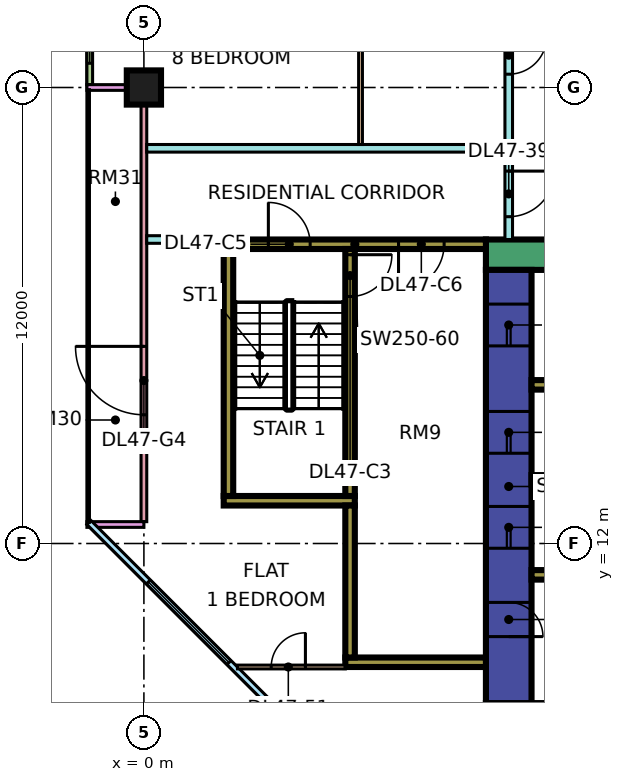
"""IFC4 building model, lengths in metres.
Left out: names, types, materials, properties, quantities, classifications, styles, units other than length and angle.
Written with IfcOpenShell. Run it as: python <this file> out.ifc"""

import sys

from ifc_helpers import new_model, si_unit, direction, frame, frame_2d, origin, origin_2d, place, context, subcontext, project, spatial, rectangle, extrude, element, fill, save


model = new_model("IFC4")
c1 = context("Model", 3, precision=1e-05, world=origin(), true_north=direction((0.0, 1.0)))
c2 = subcontext(c1, "Body", "Model", "MODEL_VIEW")
j1 = project(units=[si_unit("LENGTHUNIT", "METRE"), si_unit("PLANEANGLEUNIT", "RADIAN")], contexts=[c1])
p1 = place(None, origin())
s1 = spatial("IfcSite", under=j1, at=p1, CompositionType="ELEMENT")
p2 = place(p1, origin())
s2 = spatial("IfcBuilding", under=s1, at=p2, CompositionType="ELEMENT")
p3 = place(p2, frame((0.0, 0.0, 202.4)))
s3 = spatial("IfcBuildingStorey", under=s2, at=p3, CompositionType="ELEMENT", Elevation=202.4)
p4 = place(p3, frame((0.0, 24.0, 0.0), z_axis=(0.0, 0.0, 1.0), x_axis=(1.0, 0.0, 0.0)))
e1 = element("IfcColumn", 1, at=p4, inside=s3, PredefinedType="COLUMN", context=c2, shape_type="SweptSolid", body=[
    extrude(rectangle(XDim=0.9, YDim=0.9, at=origin_2d()), origin(), (0.0, 0.0, 1.0), 3.75),
])
p5 = place(p3, frame((9.0, 19.6, 0.0), z_axis=(0.0, 0.0, 1.0), x_axis=(1.0, 0.0, 0.0)))
e2 = element("IfcWall", 2, at=p5, inside=s3, PredefinedType="SHEAR", context=c2, shape_type="SweptSolid", body=[
    extrude(rectangle(XDim=25.0, YDim=0.8, at=frame_2d((12.5, 0.0))), origin(), (0.0, 0.0, 1.0), 3.75),
])
p6 = place(p5, frame((19.1, 0.0, 0.0)))
e3 = element("IfcOpeningElement", 3, at=p6, cuts=e2, PredefinedType="OPENING", context=c2, shape_type="SweptSolid", body=[
    extrude(rectangle(XDim=1.8, YDim=2.4, at=frame_2d((0.9, 1.2))), frame((0.0, 0.41, 0.0), z_axis=(0.0, -1.0, 0.0), x_axis=(1.0, 0.0, 0.0)), (0.0, 0.0, 1.0), 0.82),
])
p7 = place(p3, frame((9.6, 7.8, 0.0), z_axis=(0.0, 0.0, 1.0), x_axis=(0.0, 1.0, 0.0)))
e4 = element("IfcWall", 4, at=p7, inside=s3, PredefinedType="SHEAR", context=c2, shape_type="SweptSolid", body=[
    extrude(rectangle(XDim=11.4, YDim=1.2, at=frame_2d((5.7, 0.0))), origin(), (0.0, 0.0, 1.0), 3.75),
])
p8 = place(p7, frame((4.075, 0.0, 0.0)))
e5 = element("IfcOpeningElement", 5, at=p8, cuts=e4, PredefinedType="OPENING", context=c2, shape_type="SweptSolid", body=[
    extrude(rectangle(XDim=1.1, YDim=2.2, at=frame_2d((0.55, 1.1))), frame((0.0, 0.61, 0.0), z_axis=(0.0, -1.0, 0.0), x_axis=(1.0, 0.0, 0.0)), (0.0, 0.0, 1.0), 1.22),
])
p9 = place(p7, frame((6.575, 0.0, 0.0)))
e6 = element("IfcOpeningElement", 6, at=p9, cuts=e4, PredefinedType="OPENING", context=c2, shape_type="SweptSolid", body=[
    extrude(rectangle(XDim=1.1, YDim=2.2, at=frame_2d((0.55, 1.1))), frame((0.0, 0.61, 0.0), z_axis=(0.0, -1.0, 0.0), x_axis=(1.0, 0.0, 0.0)), (0.0, 0.0, 1.0), 1.22),
])
p10 = place(p7, frame((9.4, 0.0, 0.0)))
e7 = element("IfcOpeningElement", 7, at=p10, cuts=e4, PredefinedType="OPENING", context=c2, shape_type="SweptSolid", body=[
    extrude(rectangle(XDim=1.1, YDim=2.2, at=frame_2d((0.55, 1.1))), frame((0.0, 0.61, 0.0), z_axis=(0.0, -1.0, 0.0), x_axis=(1.0, 0.0, 0.0)), (0.0, 0.0, 1.0), 1.22),
])
p11 = place(p7, frame((1.75, 0.0, 0.0)))
e8 = element("IfcOpeningElement", 8, at=p11, cuts=e4, PredefinedType="OPENING", context=c2, shape_type="SweptSolid", body=[
    extrude(rectangle(XDim=0.9, YDim=2.1, at=frame_2d((0.45, 1.05))), frame((0.0, 0.61, 0.0), z_axis=(0.0, -1.0, 0.0), x_axis=(1.0, 0.0, 0.0)), (0.0, 0.0, 1.0), 1.22),
])
for number, where, z_axis, x_axis in (
    (9, (10.2, 11.175, 0.0), (0.0, 0.0, 1.0), (1.0, 0.0, 0.0)),
    (10, (10.2, 13.675, 0.0), (0.0, 0.0, 1.0), (1.0, 0.0, 0.0)),
    (11, (10.2, 16.175, 0.0), (0.0, 0.0, 1.0), (1.0, 0.0, 0.0)),
):
    element("IfcWall", number, at=place(p3, frame(where, z_axis=z_axis, x_axis=x_axis)), inside=s3, PredefinedType="SHEAR", context=c2, shape_type="SweptSolid", body=[
        extrude(rectangle(XDim=3.0, YDim=0.25, at=frame_2d((1.5, 0.0))), origin(), (0.0, 0.0, 1.0), 3.75),
    ])
p12 = place(p3, frame((2.1, 19.875, 0.0), z_axis=(0.0, 0.0, 1.0), x_axis=(1.0, 0.0, 0.0)))
e12 = element("IfcWall", 12, at=p12, inside=s3, PredefinedType="SHEAR", context=c2, shape_type="SweptSolid", body=[
    extrude(rectangle(XDim=6.9, YDim=0.25, at=frame_2d((3.45, 0.0))), origin(), (0.0, 0.0, 1.0), 3.75),
])
p13 = place(p12, frame((1.175, 0.0, 0.0)))
e13 = element("IfcOpeningElement", 13, at=p13, cuts=e12, PredefinedType="OPENING", context=c2, shape_type="SweptSolid", body=[
    extrude(rectangle(XDim=1.1, YDim=2.2, at=frame_2d((0.55, 1.1))), frame((0.0, 0.135, 0.0), z_axis=(0.0, -1.0, 0.0), x_axis=(1.0, 0.0, 0.0)), (0.0, 0.0, 1.0), 0.27),
])
p14 = place(p12, frame((4.6, 0.0, 0.0)))
e14 = element("IfcOpeningElement", 14, at=p14, cuts=e12, PredefinedType="OPENING", context=c2, shape_type="SweptSolid", body=[
    extrude(rectangle(XDim=1.2, YDim=2.2, at=frame_2d((0.6, 1.1))), frame((0.0, 0.135, 0.0), z_axis=(0.0, -1.0, 0.0), x_axis=(1.0, 0.0, 0.0)), (0.0, 0.0, 1.0), 0.27),
])
p15 = place(p3, frame((2.1, 13.125, 0.0), z_axis=(0.0, 0.0, 1.0), x_axis=(1.0, 0.0, 0.0)))
e15 = element("IfcWall", 15, at=p15, inside=s3, PredefinedType="SHEAR", context=c2, shape_type="SweptSolid", body=[
    extrude(rectangle(XDim=3.45, YDim=0.25, at=frame_2d((1.725, 0.0))), origin(), (0.0, 0.0, 1.0), 3.75),
])
p16 = place(p3, frame((2.225, 13.25, 0.0), z_axis=(0.0, 0.0, 1.0), x_axis=(0.0, 1.0, 0.0)))
e16 = element("IfcWall", 16, at=p16, inside=s3, PredefinedType="SHEAR", context=c2, shape_type="SweptSolid", body=[
    extrude(rectangle(XDim=6.5, YDim=0.25, at=frame_2d((3.25, 0.0))), origin(), (0.0, 0.0, 1.0), 3.75),
])
p17 = place(p3, frame((5.425, 13.25, 0.0), z_axis=(0.0, 0.0, 1.0), x_axis=(0.0, 1.0, 0.0)))
e17 = element("IfcWall", 17, at=p17, inside=s3, PredefinedType="SHEAR", context=c2, shape_type="SweptSolid", body=[
    extrude(rectangle(XDim=6.5, YDim=0.25, at=frame_2d((3.25, 0.0))), origin(), (0.0, 0.0, 1.0), 3.75),
])
p18 = place(p17, frame((5.25, 0.0, 0.0)))
e18 = element("IfcOpeningElement", 18, at=p18, cuts=e17, PredefinedType="OPENING", context=c2, shape_type="SweptSolid", body=[
    extrude(rectangle(XDim=1.1, YDim=2.2, at=frame_2d((0.55, 1.1))), frame((0.0, 0.135, 0.0), z_axis=(0.0, -1.0, 0.0), x_axis=(1.0, 0.0, 0.0)), (0.0, 0.0, 1.0), 0.27),
])
p19 = place(p3, frame((5.3, 8.875, 0.0), z_axis=(0.0, 0.0, 1.0), x_axis=(1.0, 0.0, 0.0)))
e19 = element("IfcWall", 19, at=p19, inside=s3, PredefinedType="SHEAR", context=c2, shape_type="SweptSolid", body=[
    extrude(rectangle(XDim=3.7, YDim=0.25, at=frame_2d((1.85, 0.0))), origin(), (0.0, 0.0, 1.0), 3.75),
])
p20 = place(p3, frame((5.425, 9.0, 0.0), z_axis=(0.0, 0.0, 1.0), x_axis=(0.0, 1.0, 0.0)))
e20 = element("IfcWall", 20, at=p20, inside=s3, PredefinedType="SHEAR", context=c2, shape_type="SweptSolid", body=[
    extrude(rectangle(XDim=4.0, YDim=0.25, at=frame_2d((2.0, 0.0))), origin(), (0.0, 0.0, 1.0), 3.75),
])
p21 = place(p3, frame((-1.425, 35.925, 0.0), z_axis=(0.0, 0.0, 1.0), x_axis=(0.0, -1.0, 0.0)))
e21 = element("IfcWall", 21, at=p21, inside=s3, PredefinedType="SOLIDWALL", context=c2, shape_type="SweptSolid", body=[
    extrude(rectangle(XDim=11.85, YDim=0.15, at=frame_2d((5.925, 0.0))), origin(), (0.0, 0.0, 1.0), 3.3),
])
p22 = place(p21, frame((0.562, 0.0, 0.45)))
e22 = element("IfcOpeningElement", 22, at=p22, cuts=e21, PredefinedType="OPENING", context=c2, shape_type="SweptSolid", body=[
    extrude(rectangle(XDim=1.8, YDim=2.4, at=frame_2d((0.9, 1.2))), frame((0.0, 0.085, 0.0), z_axis=(0.0, -1.0, 0.0), x_axis=(1.0, 0.0, 0.0)), (0.0, 0.0, 1.0), 0.17),
])
p23 = place(p21, frame((3.525, 0.0, 0.45)))
e23 = element("IfcOpeningElement", 23, at=p23, cuts=e21, PredefinedType="OPENING", context=c2, shape_type="SweptSolid", body=[
    extrude(rectangle(XDim=4.8, YDim=2.4, at=frame_2d((2.4, 1.2))), frame((0.0, 0.085, 0.0), z_axis=(0.0, -1.0, 0.0), x_axis=(1.0, 0.0, 0.0)), (0.0, 0.0, 1.0), 0.17),
])
p24 = place(p21, frame((9.488, 0.0, 0.45)))
e24 = element("IfcOpeningElement", 24, at=p24, cuts=e21, PredefinedType="OPENING", context=c2, shape_type="SweptSolid", body=[
    extrude(rectangle(XDim=1.8, YDim=2.4, at=frame_2d((0.9, 1.2))), frame((0.0, 0.085, 0.0), z_axis=(0.0, -1.0, 0.0), x_axis=(1.0, 0.0, 0.0)), (0.0, 0.0, 1.0), 0.17),
])
p25 = place(p3, frame((0.0, 23.925, 0.0), z_axis=(0.0, 0.0, 1.0), x_axis=(0.0, -1.0, 0.0)))
e25 = element("IfcWall", 25, at=p25, inside=s3, PredefinedType="SOLIDWALL", context=c2, shape_type="SweptSolid", body=[
    extrude(rectangle(XDim=11.35, YDim=0.15, at=frame_2d((5.675, 0.0))), origin(), (0.0, 0.0, 1.0), 3.3),
])
p26 = place(p25, frame((6.738, 0.0, 0.0)))
e26 = element("IfcOpeningElement", 26, at=p26, cuts=e25, PredefinedType="OPENING", context=c2, shape_type="SweptSolid", body=[
    extrude(rectangle(XDim=1.8, YDim=2.4, at=frame_2d((0.9, 1.2))), frame((0.0, 0.085, 0.0), z_axis=(0.0, -1.0, 0.0), x_axis=(1.0, 0.0, 0.0)), (0.0, 0.0, 1.0), 0.17),
])
for number, where, z_axis, x_axis in (
    (27, (-1.5, 24.0, 0.0), (0.0, 0.0, 1.0), (1.0, 0.0, 0.0)),
    (28, (-1.5, 12.5, 0.0), (0.0, 0.0, 1.0), (1.0, 0.0, 0.0)),
):
    element("IfcWall", number, at=place(p3, frame(where, z_axis=z_axis, x_axis=x_axis)), inside=s3, PredefinedType="SOLIDWALL", context=c2, shape_type="SweptSolid", body=[
        extrude(rectangle(XDim=1.5, YDim=0.15, at=frame_2d((0.75, 0.0))), origin(), (0.0, 0.0, 1.0), 3.3),
    ])
p27 = place(p3, frame((-1.447, 12.553, 0.0), z_axis=(0.0, 0.0, 1.0), x_axis=(0.707106781187, -0.707106781187, 0.0)))
e29 = element("IfcWall", 29, at=p27, inside=s3, PredefinedType="SOLIDWALL", context=c2, shape_type="SweptSolid", body=[
    extrude(rectangle(XDim=19.799, YDim=0.15, at=frame_2d((9.899, 0.0))), origin(), (0.0, 0.0, 1.0), 3.3),
])
p28 = place(p27, frame((2.212, 0.0, 0.45)))
e30 = element("IfcOpeningElement", 30, at=p28, cuts=e29, PredefinedType="OPENING", context=c2, shape_type="SweptSolid", body=[
    extrude(rectangle(XDim=3.0, YDim=2.4, at=frame_2d((1.5, 1.2))), frame((0.0, 0.085, 0.0), z_axis=(0.0, -1.0, 0.0), x_axis=(1.0, 0.0, 0.0)), (0.0, 0.0, 1.0), 0.17),
])
p29 = place(p27, frame((10.216, 0.0, 0.45)))
e31 = element("IfcOpeningElement", 31, at=p29, cuts=e29, PredefinedType="OPENING", context=c2, shape_type="SweptSolid", body=[
    extrude(rectangle(XDim=3.0, YDim=2.4, at=frame_2d((1.5, 1.2))), frame((0.0, 0.085, 0.0), z_axis=(0.0, -1.0, 0.0), x_axis=(1.0, 0.0, 0.0)), (0.0, 0.0, 1.0), 0.17),
])
p30 = place(p3, frame((0.074, 20.0, 0.0), z_axis=(0.0, 0.0, 1.0), x_axis=(1.0, 0.0, 0.0)))
e32 = element("IfcWall", 32, at=p30, inside=s3, PredefinedType="PARTITIONING", context=c2, shape_type="SweptSolid", body=[
    extrude(rectangle(XDim=2.026, YDim=0.2, at=frame_2d((1.013, 0.0))), origin(), (0.0, 0.0, 1.0), 3.3),
])
p31 = place(p3, frame((0.074, 22.4, 0.0), z_axis=(0.0, 0.0, 1.0), x_axis=(1.0, 0.0, 0.0)))
e33 = element("IfcWall", 33, at=p31, inside=s3, PredefinedType="PARTITIONING", context=c2, shape_type="SweptSolid", body=[
    extrude(rectangle(XDim=9.426, YDim=0.2, at=frame_2d((4.713, 0.0))), origin(), (0.0, 0.0, 1.0), 3.3),
])
p32 = place(p3, frame((2.461, 8.75, 0.0), z_axis=(0.0, 0.0, 1.0), x_axis=(1.0, 0.0, 0.0)))
e34 = element("IfcWall", 34, at=p32, inside=s3, PredefinedType="PARTITIONING", context=c2, shape_type="SweptSolid", body=[
    extrude(rectangle(XDim=2.839, YDim=0.1, at=frame_2d((1.419, 0.0))), origin(), (0.0, 0.0, 1.0), 3.3),
])
p33 = place(p32, frame((0.889, 0.0, 0.0)))
e35 = element("IfcOpeningElement", 35, at=p33, cuts=e34, PredefinedType="OPENING", context=c2, shape_type="SweptSolid", body=[
    extrude(rectangle(XDim=0.9, YDim=2.1, at=frame_2d((0.45, 1.05))), frame((0.0, 0.06, 0.0), z_axis=(0.0, -1.0, 0.0), x_axis=(1.0, 0.0, 0.0)), (0.0, 0.0, 1.0), 0.12),
])
p34 = place(p3, frame((5.7, 22.5, 0.0), z_axis=(0.0, 0.0, 1.0), x_axis=(0.0, 1.0, 0.0)))
e36 = element("IfcWall", 36, at=p34, inside=s3, PredefinedType="PARTITIONING", context=c2, shape_type="SweptSolid", body=[
    extrude(rectangle(XDim=4.45, YDim=0.1, at=frame_2d((2.225, 0.0))), origin(), (0.0, 0.0, 1.0), 3.3),
])
p35 = place(p3, frame((9.6, 20.0, 0.0), z_axis=(0.0, 0.0, 1.0), x_axis=(0.0, 1.0, 0.0)))
e37 = element("IfcWall", 37, at=p35, inside=s3, PredefinedType="PARTITIONING", context=c2, shape_type="SweptSolid", body=[
    extrude(rectangle(XDim=44.35, YDim=0.2, at=frame_2d((22.175, 0.0))), origin(), (0.0, 0.0, 1.0), 3.3),
])
p36 = place(p35, frame((17.1, 0.0, 0.0)))
e38 = element("IfcOpeningElement", 38, at=p36, cuts=e37, PredefinedType="OPENING", context=c2, shape_type="SweptSolid", body=[
    extrude(rectangle(XDim=1.0, YDim=2.1, at=frame_2d((0.5, 1.05))), frame((0.0, 0.11, 0.0), z_axis=(0.0, -1.0, 0.0), x_axis=(1.0, 0.0, 0.0)), (0.0, 0.0, 1.0), 0.22),
])
p37 = place(p35, frame((29.1, 0.0, 0.0)))
e39 = element("IfcOpeningElement", 39, at=p37, cuts=e37, PredefinedType="OPENING", context=c2, shape_type="SweptSolid", body=[
    extrude(rectangle(XDim=1.0, YDim=2.1, at=frame_2d((0.5, 1.05))), frame((0.0, 0.11, 0.0), z_axis=(0.0, -1.0, 0.0), x_axis=(1.0, 0.0, 0.0)), (0.0, 0.0, 1.0), 0.22),
])
p38 = place(p35, frame((0.6, 0.0, 0.0)))
e40 = element("IfcOpeningElement", 40, at=p38, cuts=e37, PredefinedType="OPENING", context=c2, shape_type="SweptSolid", body=[
    extrude(rectangle(XDim=1.2, YDim=2.1, at=frame_2d((0.6, 1.05))), frame((0.0, 0.11, 0.0), z_axis=(0.0, -1.0, 0.0), x_axis=(1.0, 0.0, 0.0)), (0.0, 0.0, 1.0), 0.22),
])
p39 = place(p35, frame((4.35, 0.0, 0.0)))
e41 = element("IfcOpeningElement", 41, at=p39, cuts=e37, PredefinedType="OPENING", context=c2, shape_type="SweptSolid", body=[
    extrude(rectangle(XDim=1.0, YDim=2.1, at=frame_2d((0.5, 1.05))), frame((0.0, 0.11, 0.0), z_axis=(0.0, -1.0, 0.0), x_axis=(1.0, 0.0, 0.0)), (0.0, 0.0, 1.0), 0.22),
])
p40 = place(p24, origin())
e42 = element("IfcWindow", 42, at=p40, inside=s3, PartitioningType="SINGLE_PANEL", PredefinedType="WINDOW", context=c2, shape_type="SweptSolid", body=[
    extrude(rectangle(XDim=1.8, YDim=2.4, at=frame_2d((0.9, 1.2))), frame((0.0, 0.03, 0.0), z_axis=(0.0, -1.0, 0.0), x_axis=(1.0, 0.0, 0.0)), (0.0, 0.0, 1.0), 0.06),
])
fill(e24, e42)
p41 = place(p26, frame((1.8, 0.0, 0.0), z_axis=(0.0, 0.0, 1.0), x_axis=(-1.0, 0.0, 0.0)))
e43 = element("IfcDoor", 43, at=p41, inside=s3, OperationType="DOUBLE_DOOR_SINGLE_SWING", PredefinedType="DOOR", context=c2, shape_type="SweptSolid", body=[
    extrude(rectangle(XDim=1.8, YDim=2.4, at=frame_2d((0.9, 1.2))), frame((0.0, 0.025, 0.0), z_axis=(0.0, -1.0, 0.0), x_axis=(1.0, 0.0, 0.0)), (0.0, 0.0, 1.0), 0.05),
])
fill(e26, e43)
p42 = place(p28, origin())
e44 = element("IfcWindow", 44, at=p42, inside=s3, PartitioningType="SINGLE_PANEL", PredefinedType="WINDOW", context=c2, shape_type="SweptSolid", body=[
    extrude(rectangle(XDim=3.0, YDim=2.4, at=frame_2d((1.5, 1.2))), frame((0.0, 0.03, 0.0), z_axis=(0.0, -1.0, 0.0), x_axis=(1.0, 0.0, 0.0)), (0.0, 0.0, 1.0), 0.06),
])
fill(e30, e44)
p43 = place(p8, origin())
e45 = element("IfcDoor", 45, at=p43, inside=s3, OperationType="DOUBLE_DOOR_SLIDING", PredefinedType="DOOR", context=c2, shape_type="SweptSolid", body=[
    extrude(rectangle(XDim=1.1, YDim=2.2, at=frame_2d((0.55, 1.1))), frame((0.0, 0.025, 0.0), z_axis=(0.0, -1.0, 0.0), x_axis=(1.0, 0.0, 0.0)), (0.0, 0.0, 1.0), 0.05),
])
fill(e5, e45)
p44 = place(p9, origin())
e46 = element("IfcDoor", 46, at=p44, inside=s3, OperationType="DOUBLE_DOOR_SLIDING", PredefinedType="DOOR", context=c2, shape_type="SweptSolid", body=[
    extrude(rectangle(XDim=1.1, YDim=2.2, at=frame_2d((0.55, 1.1))), frame((0.0, 0.025, 0.0), z_axis=(0.0, -1.0, 0.0), x_axis=(1.0, 0.0, 0.0)), (0.0, 0.0, 1.0), 0.05),
])
fill(e6, e46)
p45 = place(p10, origin())
e47 = element("IfcDoor", 47, at=p45, inside=s3, OperationType="DOUBLE_DOOR_SLIDING", PredefinedType="DOOR", context=c2, shape_type="SweptSolid", body=[
    extrude(rectangle(XDim=1.1, YDim=2.2, at=frame_2d((0.55, 1.1))), frame((0.0, 0.025, 0.0), z_axis=(0.0, -1.0, 0.0), x_axis=(1.0, 0.0, 0.0)), (0.0, 0.0, 1.0), 0.05),
])
fill(e7, e47)
p46 = place(p18, origin())
e48 = element("IfcDoor", 48, at=p46, inside=s3, OperationType="SINGLE_SWING_RIGHT", PredefinedType="DOOR", context=c2, shape_type="SweptSolid", body=[
    extrude(rectangle(XDim=1.1, YDim=2.2, at=frame_2d((0.55, 1.1))), frame((0.0, 0.025, 0.0), z_axis=(0.0, -1.0, 0.0), x_axis=(1.0, 0.0, 0.0)), (0.0, 0.0, 1.0), 0.05),
])
fill(e18, e48)
p47 = place(p11, frame((0.9, 0.0, 0.0), z_axis=(0.0, 0.0, 1.0), x_axis=(-1.0, 0.0, 0.0)))
e49 = element("IfcDoor", 49, at=p47, inside=s3, OperationType="SINGLE_SWING_LEFT", PredefinedType="DOOR", context=c2, shape_type="SweptSolid", body=[
    extrude(rectangle(XDim=0.9, YDim=2.1, at=frame_2d((0.45, 1.05))), frame((0.0, 0.025, 0.0), z_axis=(0.0, -1.0, 0.0), x_axis=(1.0, 0.0, 0.0)), (0.0, 0.0, 1.0), 0.05),
])
fill(e8, e49)
p48 = place(p13, origin())
e50 = element("IfcDoor", 50, at=p48, inside=s3, OperationType="SINGLE_SWING_LEFT", PredefinedType="DOOR", context=c2, shape_type="SweptSolid", body=[
    extrude(rectangle(XDim=1.1, YDim=2.2, at=frame_2d((0.55, 1.1))), frame((0.0, 0.025, 0.0), z_axis=(0.0, -1.0, 0.0), x_axis=(1.0, 0.0, 0.0)), (0.0, 0.0, 1.0), 0.05),
])
fill(e13, e50)
p49 = place(p14, frame((1.2, 0.0, 0.0), z_axis=(0.0, 0.0, 1.0), x_axis=(-1.0, 0.0, 0.0)))
e51 = element("IfcDoor", 51, at=p49, inside=s3, OperationType="SINGLE_SWING_LEFT", PredefinedType="DOOR", context=c2, shape_type="SweptSolid", body=[
    extrude(rectangle(XDim=1.2, YDim=2.2, at=frame_2d((0.6, 1.1))), frame((0.0, 0.025, 0.0), z_axis=(0.0, -1.0, 0.0), x_axis=(1.0, 0.0, 0.0)), (0.0, 0.0, 1.0), 0.05),
])
fill(e14, e51)
p50 = place(p38, origin())
e52 = element("IfcDoor", 52, at=p50, inside=s3, OperationType="SINGLE_SWING_RIGHT", PredefinedType="DOOR", context=c2, shape_type="SweptSolid", body=[
    extrude(rectangle(XDim=1.2, YDim=2.1, at=frame_2d((0.6, 1.05))), frame((0.0, 0.025, 0.0), z_axis=(0.0, -1.0, 0.0), x_axis=(1.0, 0.0, 0.0)), (0.0, 0.0, 1.0), 0.05),
])
fill(e40, e52)
p51 = place(p33, frame((0.9, 0.0, 0.0), z_axis=(0.0, 0.0, 1.0), x_axis=(-1.0, 0.0, 0.0)))
e53 = element("IfcDoor", 53, at=p51, inside=s3, OperationType="SINGLE_SWING_RIGHT", PredefinedType="DOOR", context=c2, shape_type="SweptSolid", body=[
    extrude(rectangle(XDim=0.9, YDim=2.1, at=frame_2d((0.45, 1.05))), frame((0.0, 0.025, 0.0), z_axis=(0.0, -1.0, 0.0), x_axis=(1.0, 0.0, 0.0)), (0.0, 0.0, 1.0), 0.05),
])
fill(e35, e53)
p52 = place(p39, origin())
e54 = element("IfcDoor", 54, at=p52, inside=s3, OperationType="SINGLE_SWING_RIGHT", PredefinedType="DOOR", context=c2, shape_type="SweptSolid", body=[
    extrude(rectangle(XDim=1.0, YDim=2.1, at=frame_2d((0.5, 1.05))), frame((0.0, 0.025, 0.0), z_axis=(0.0, -1.0, 0.0), x_axis=(1.0, 0.0, 0.0)), (0.0, 0.0, 1.0), 0.05),
])
fill(e41, e54)
save(model, sys.argv[1])
